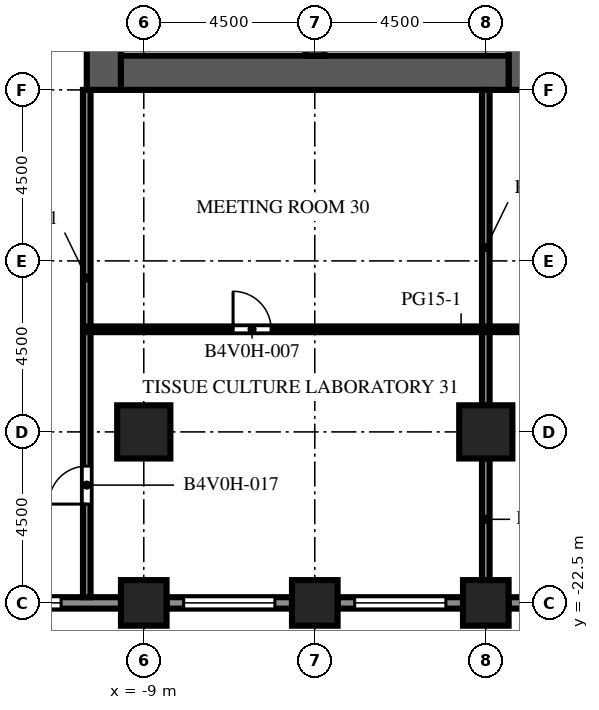
"""IFC4 building model, lengths in metres.
Left out: names, types, materials, properties, quantities, classifications, styles, units other than length and angle.
Written with IfcOpenShell. Run it as: python <this file> out.ifc"""

import sys

from ifc_helpers import new_model, si_unit, direction, frame, frame_2d, origin, origin_2d, place, context, subcontext, project, spatial, rectangle, extrude, element, fill, save


model = new_model("IFC4")
c1 = context("Model", 3, precision=1e-05, world=origin(), true_north=direction((0.0, 1.0)))
c2 = subcontext(c1, "Body", "Model", "MODEL_VIEW")
j1 = project(units=[si_unit("LENGTHUNIT", "METRE"), si_unit("PLANEANGLEUNIT", "RADIAN")], contexts=[c1])
p1 = place(None, origin())
s1 = spatial("IfcSite", under=j1, at=p1, CompositionType="ELEMENT")
p2 = place(p1, origin())
s2 = spatial("IfcBuilding", under=s1, at=p2, CompositionType="ELEMENT")
p3 = place(p2, frame((0.0, 0.0, 116.7)))
s3 = spatial("IfcBuildingStorey", under=s2, at=p3, CompositionType="ELEMENT", Elevation=116.7)
for number, where, z_axis, x_axis in (
    (1, (-9.0, -22.5, 0.0), (0.0, 0.0, 1.0), (1.0, 0.0, 0.0)),
    (2, (-4.5, -22.5, 0.0), (0.0, 0.0, 1.0), (1.0, 0.0, 0.0)),
    (3, (0.0, -22.5, 0.0), (0.0, 0.0, 1.0), (1.0, 0.0, 0.0)),
):
    element("IfcColumn", number, at=place(p3, frame(where, z_axis=z_axis, x_axis=x_axis)), inside=s3, PredefinedType="COLUMN", context=c2, shape_type="SweptSolid", body=[
        extrude(rectangle(XDim=1.2, YDim=1.2, at=origin_2d()), origin(), (0.0, 0.0, 1.0), 4.1),
    ])
p4 = place(p3, frame((-9.0, -18.0, -0.45), z_axis=(0.0, 0.0, 1.0), x_axis=(1.0, 0.0, 0.0)))
e4 = element("IfcColumn", 4, at=p4, inside=s3, PredefinedType="COLUMN", context=c2, shape_type="SweptSolid", body=[
    extrude(rectangle(XDim=1.4, YDim=1.4, at=origin_2d()), origin(), (0.0, 0.0, 1.0), 4.55),
])
p5 = place(p3, frame((0.0, -18.0, 0.0), z_axis=(0.0, 0.0, 1.0), x_axis=(1.0, 0.0, 0.0)))
e5 = element("IfcColumn", 5, at=p5, inside=s3, PredefinedType="COLUMN", context=c2, shape_type="SweptSolid", body=[
    extrude(rectangle(XDim=1.4, YDim=1.4, at=origin_2d()), origin(), (0.0, 0.0, 1.0), 4.1),
])
p6 = place(p3, frame((-10.05, -9.0, 0.0), z_axis=(0.0, 0.0, 1.0), x_axis=(0.0, 1.0, 0.0)))
e6 = element("IfcWall", 6, at=p6, inside=s3, PredefinedType="SHEAR", context=c2, shape_type="SweptSolid", body=[
    extrude(rectangle(XDim=27.5, YDim=0.9, at=frame_2d((13.75, 0.0))), origin(), (0.0, 0.0, 1.0), 4.1),
])
p7 = place(p6, frame((12.55, 0.0, 0.0)))
e7 = element("IfcOpeningElement", 7, at=p7, cuts=e6, PredefinedType="OPENING", context=c2, shape_type="SweptSolid", body=[
    extrude(rectangle(XDim=2.4, YDim=2.4, at=frame_2d((1.2, 1.2))), frame((0.0, 0.46, 0.0), z_axis=(0.0, -1.0, 0.0), x_axis=(1.0, 0.0, 0.0)), (0.0, 0.0, 1.0), 0.92),
])
p8 = place(p6, frame((6.825, 0.0, 0.0)))
e8 = element("IfcOpeningElement", 8, at=p8, cuts=e6, PredefinedType="OPENING", context=c2, shape_type="SweptSolid", body=[
    extrude(rectangle(XDim=1.2, YDim=2.1, at=frame_2d((0.6, 1.05))), frame((0.0, 0.46, 0.0), z_axis=(0.0, -1.0, 0.0), x_axis=(1.0, 0.0, 0.0)), (0.0, 0.0, 1.0), 0.92),
])
p9 = place(p6, frame((19.475, 0.0, 0.0)))
e9 = element("IfcOpeningElement", 9, at=p9, cuts=e6, PredefinedType="OPENING", context=c2, shape_type="SweptSolid", body=[
    extrude(rectangle(XDim=1.2, YDim=2.1, at=frame_2d((0.6, 1.05))), frame((0.0, 0.46, 0.0), z_axis=(0.0, -1.0, 0.0), x_axis=(1.0, 0.0, 0.0)), (0.0, 0.0, 1.0), 0.92),
])
p10 = place(p3, frame((1.05, -9.0, 0.0), z_axis=(0.0, 0.0, 1.0), x_axis=(0.0, 1.0, 0.0)))
e10 = element("IfcWall", 10, at=p10, inside=s3, PredefinedType="SHEAR", context=c2, shape_type="SweptSolid", body=[
    extrude(rectangle(XDim=27.5, YDim=0.9, at=frame_2d((13.75, 0.0))), origin(), (0.0, 0.0, 1.0), 4.1),
])
p11 = place(p10, frame((12.55, 0.0, 0.0)))
e11 = element("IfcOpeningElement", 11, at=p11, cuts=e10, PredefinedType="OPENING", context=c2, shape_type="SweptSolid", body=[
    extrude(rectangle(XDim=2.4, YDim=2.4, at=frame_2d((1.2, 1.2))), frame((0.0, 0.46, 0.0), z_axis=(0.0, -1.0, 0.0), x_axis=(1.0, 0.0, 0.0)), (0.0, 0.0, 1.0), 0.92),
])
p12 = place(p10, frame((3.975, 0.0, 0.0)))
e12 = element("IfcOpeningElement", 12, at=p12, cuts=e10, PredefinedType="OPENING", context=c2, shape_type="SweptSolid", body=[
    extrude(rectangle(XDim=1.2, YDim=2.1, at=frame_2d((0.6, 1.05))), frame((0.0, 0.46, 0.0), z_axis=(0.0, -1.0, 0.0), x_axis=(1.0, 0.0, 0.0)), (0.0, 0.0, 1.0), 0.92),
])
p13 = place(p10, frame((19.485, 0.0, 0.0)))
e13 = element("IfcOpeningElement", 13, at=p13, cuts=e10, PredefinedType="OPENING", context=c2, shape_type="SweptSolid", body=[
    extrude(rectangle(XDim=1.0, YDim=2.1, at=frame_2d((0.5, 1.05))), frame((0.0, 0.46, 0.0), z_axis=(0.0, -1.0, 0.0), x_axis=(1.0, 0.0, 0.0)), (0.0, 0.0, 1.0), 0.92),
])
p14 = place(p10, frame((21.139, 0.0, 0.0)))
e14 = element("IfcOpeningElement", 14, at=p14, cuts=e10, PredefinedType="OPENING", context=c2, shape_type="SweptSolid", body=[
    extrude(rectangle(XDim=1.0, YDim=2.1, at=frame_2d((0.5, 1.05))), frame((0.0, 0.46, 0.0), z_axis=(0.0, -1.0, 0.0), x_axis=(1.0, 0.0, 0.0)), (0.0, 0.0, 1.0), 0.92),
])
p15 = place(p10, frame((23.16, 0.0, 0.0)))
e15 = element("IfcOpeningElement", 15, at=p15, cuts=e10, PredefinedType="OPENING", context=c2, shape_type="SweptSolid", body=[
    extrude(rectangle(XDim=1.0, YDim=2.1, at=frame_2d((0.5, 1.05))), frame((0.0, 0.46, 0.0), z_axis=(0.0, -1.0, 0.0), x_axis=(1.0, 0.0, 0.0)), (0.0, 0.0, 1.0), 0.92),
])
p16 = place(p10, frame((25.181, 0.0, 0.0)))
e16 = element("IfcOpeningElement", 16, at=p16, cuts=e10, PredefinedType="OPENING", context=c2, shape_type="SweptSolid", body=[
    extrude(rectangle(XDim=1.0, YDim=2.1, at=frame_2d((0.5, 1.05))), frame((0.0, 0.46, 0.0), z_axis=(0.0, -1.0, 0.0), x_axis=(1.0, 0.0, 0.0)), (0.0, 0.0, 1.0), 0.92),
])
p17 = place(p3, frame((-9.6, -8.55, 0.0), z_axis=(0.0, 0.0, 1.0), x_axis=(1.0, 0.0, 0.0)))
e17 = element("IfcWall", 17, at=p17, inside=s3, PredefinedType="SHEAR", context=c2, shape_type="SweptSolid", body=[
    extrude(rectangle(XDim=10.2, YDim=0.9, at=frame_2d((5.1, 0.0))), origin(), (0.0, 0.0, 1.0), 4.1),
])
p18 = place(p3, frame((-4.5, -8.1, 0.0), z_axis=(0.0, 0.0, 1.0), x_axis=(0.0, 1.0, 0.0)))
e18 = element("IfcWall", 18, at=p18, inside=s3, PredefinedType="SHEAR", context=c2, shape_type="SweptSolid", body=[
    extrude(rectangle(XDim=7.35, YDim=0.5, at=frame_2d((3.675, 0.0))), origin(), (0.0, 0.0, 1.0), 4.1),
])
p19 = place(p3, frame((-9.6, -22.5, 0.0), z_axis=(0.0, 0.0, 1.0), x_axis=(-1.0, 0.0, 0.0)))
e19 = element("IfcWall", 19, at=p19, inside=s3, PredefinedType="SOLIDWALL", context=c2, shape_type="SweptSolid", body=[
    extrude(rectangle(XDim=3.3, YDim=0.3, at=frame_2d((1.65, 0.0))), origin(), (0.0, 0.0, 1.0), 2.75),
])
p20 = place(p19, frame((1.575, 0.0, 0.8)))
e20 = element("IfcOpeningElement", 20, at=p20, cuts=e19, PredefinedType="OPENING", context=c2, shape_type="SweptSolid", body=[
    extrude(rectangle(XDim=1.2, YDim=1.7, at=frame_2d((0.6, 0.85))), frame((0.0, 0.16, 0.0), z_axis=(0.0, -1.0, 0.0), x_axis=(1.0, 0.0, 0.0)), (0.0, 0.0, 1.0), 0.32),
])
p21 = place(p3, frame((-5.1, -22.5, 0.0), z_axis=(0.0, 0.0, 1.0), x_axis=(-1.0, 0.0, 0.0)))
e21 = element("IfcWall", 21, at=p21, inside=s3, PredefinedType="SOLIDWALL", context=c2, shape_type="SweptSolid", body=[
    extrude(rectangle(XDim=3.3, YDim=0.3, at=frame_2d((1.65, 0.0))), origin(), (0.0, 0.0, 1.0), 2.75),
])
p22 = place(p21, frame((0.45, 0.0, 0.8)))
e22 = element("IfcOpeningElement", 22, at=p22, cuts=e21, PredefinedType="OPENING", context=c2, shape_type="SweptSolid", body=[
    extrude(rectangle(XDim=2.4, YDim=1.7, at=frame_2d((1.2, 0.85))), frame((0.0, 0.16, 0.0), z_axis=(0.0, -1.0, 0.0), x_axis=(1.0, 0.0, 0.0)), (0.0, 0.0, 1.0), 0.32),
])
p23 = place(p3, frame((-0.6, -22.5, 0.0), z_axis=(0.0, 0.0, 1.0), x_axis=(-1.0, 0.0, 0.0)))
e23 = element("IfcWall", 23, at=p23, inside=s3, PredefinedType="SOLIDWALL", context=c2, shape_type="SweptSolid", body=[
    extrude(rectangle(XDim=3.3, YDim=0.3, at=frame_2d((1.65, 0.0))), origin(), (0.0, 0.0, 1.0), 2.75),
])
p24 = place(p23, frame((0.45, 0.0, 0.8)))
e24 = element("IfcOpeningElement", 24, at=p24, cuts=e23, PredefinedType="OPENING", context=c2, shape_type="SweptSolid", body=[
    extrude(rectangle(XDim=2.4, YDim=1.7, at=frame_2d((1.2, 0.85))), frame((0.0, 0.16, 0.0), z_axis=(0.0, -1.0, 0.0), x_axis=(1.0, 0.0, 0.0)), (0.0, 0.0, 1.0), 0.32),
])
p25 = place(p3, frame((3.9, -22.5, 0.0), z_axis=(0.0, 0.0, 1.0), x_axis=(-1.0, 0.0, 0.0)))
e25 = element("IfcWall", 25, at=p25, inside=s3, PredefinedType="SOLIDWALL", context=c2, shape_type="SweptSolid", body=[
    extrude(rectangle(XDim=3.3, YDim=0.3, at=frame_2d((1.65, 0.0))), origin(), (0.0, 0.0, 1.0), 2.75),
])
p26 = place(p25, frame((0.45, 0.0, 0.8)))
e26 = element("IfcOpeningElement", 26, at=p26, cuts=e25, PredefinedType="OPENING", context=c2, shape_type="SweptSolid", body=[
    extrude(rectangle(XDim=2.4, YDim=1.7, at=frame_2d((1.2, 0.85))), frame((0.0, 0.16, 0.0), z_axis=(0.0, -1.0, 0.0), x_axis=(1.0, 0.0, 0.0)), (0.0, 0.0, 1.0), 0.32),
])
p27 = place(p3, frame((-10.5, -9.0, 0.0), z_axis=(0.0, 0.0, 1.0), x_axis=(0.0, -1.0, 0.0)))
e27 = element("IfcWall", 27, at=p27, inside=s3, PredefinedType="PARTITIONING", context=c2, shape_type="SweptSolid", body=[
    extrude(rectangle(XDim=13.35, YDim=0.2, at=frame_2d((6.675, 0.0))), origin(), (0.0, 0.0, 1.0), 3.65),
])
p28 = place(p27, frame((9.9, 0.0, 0.0)))
e28 = element("IfcOpeningElement", 28, at=p28, cuts=e27, PredefinedType="OPENING", context=c2, shape_type="SweptSolid", body=[
    extrude(rectangle(XDim=1.0, YDim=2.1, at=frame_2d((0.5, 1.05))), frame((0.0, 0.11, 0.0), z_axis=(0.0, -1.0, 0.0), x_axis=(1.0, 0.0, 0.0)), (0.0, 0.0, 1.0), 0.22),
])
p29 = place(p3, frame((0.0, -21.9, 0.0), z_axis=(0.0, 0.0, 1.0), x_axis=(0.0, 1.0, 0.0)))
e29 = element("IfcWall", 29, at=p29, inside=s3, PredefinedType="PARTITIONING", context=c2, shape_type="SweptSolid", body=[
    extrude(rectangle(XDim=3.2, YDim=0.2, at=frame_2d((1.6, 0.0))), origin(), (0.0, 0.0, 1.0), 3.65),
])
p30 = place(p3, frame((0.0, -17.3, 0.0), z_axis=(0.0, 0.0, 1.0), x_axis=(0.0, 1.0, 0.0)))
e30 = element("IfcWall", 30, at=p30, inside=s3, PredefinedType="PARTITIONING", context=c2, shape_type="SweptSolid", body=[
    extrude(rectangle(XDim=8.3, YDim=0.2, at=frame_2d((4.15, 0.0))), origin(), (0.0, 0.0, 1.0), 3.65),
])
p31 = place(p3, frame((-10.5, -15.3, 0.0), z_axis=(0.0, 0.0, 1.0), x_axis=(1.0, 0.0, 0.0)))
e31 = element("IfcWall", 31, at=p31, inside=s3, PredefinedType="PARTITIONING", context=c2, shape_type="SweptSolid", body=[
    extrude(rectangle(XDim=28.5, YDim=0.15, at=frame_2d((14.25, 0.0))), origin(), (0.0, 0.0, 1.0), 3.65),
])
p32 = place(p31, frame((3.85, 0.0, 0.0)))
e32 = element("IfcOpeningElement", 32, at=p32, cuts=e31, PredefinedType="OPENING", context=c2, shape_type="SweptSolid", body=[
    extrude(rectangle(XDim=1.0, YDim=2.1, at=frame_2d((0.5, 1.05))), frame((0.0, 0.085, 0.0), z_axis=(0.0, -1.0, 0.0), x_axis=(1.0, 0.0, 0.0)), (0.0, 0.0, 1.0), 0.17),
])
p33 = place(p31, frame((14.85, 0.0, 0.0)))
e33 = element("IfcOpeningElement", 33, at=p33, cuts=e31, PredefinedType="OPENING", context=c2, shape_type="SweptSolid", body=[
    extrude(rectangle(XDim=1.0, YDim=2.1, at=frame_2d((0.5, 1.05))), frame((0.0, 0.085, 0.0), z_axis=(0.0, -1.0, 0.0), x_axis=(1.0, 0.0, 0.0)), (0.0, 0.0, 1.0), 0.17),
])
p34 = place(p31, frame((21.85, 0.0, 0.0)))
e34 = element("IfcOpeningElement", 34, at=p34, cuts=e31, PredefinedType="OPENING", context=c2, shape_type="SweptSolid", body=[
    extrude(rectangle(XDim=1.0, YDim=2.1, at=frame_2d((0.5, 1.05))), frame((0.0, 0.085, 0.0), z_axis=(0.0, -1.0, 0.0), x_axis=(1.0, 0.0, 0.0)), (0.0, 0.0, 1.0), 0.17),
])
p35 = place(p31, frame((26.1, 0.0, 0.0)))
e35 = element("IfcOpeningElement", 35, at=p35, cuts=e31, PredefinedType="OPENING", context=c2, shape_type="SweptSolid", body=[
    extrude(rectangle(XDim=1.0, YDim=2.1, at=frame_2d((0.5, 1.05))), frame((0.0, 0.085, 0.0), z_axis=(0.0, -1.0, 0.0), x_axis=(1.0, 0.0, 0.0)), (0.0, 0.0, 1.0), 0.17),
])
p36 = place(p20, origin())
e36 = element("IfcWindow", 36, at=p36, inside=s3, PartitioningType="SINGLE_PANEL", PredefinedType="WINDOW", context=c2, shape_type="SweptSolid", body=[
    extrude(rectangle(XDim=1.2, YDim=1.7, at=frame_2d((0.6, 0.85))), frame((0.0, 0.03, 0.0), z_axis=(0.0, -1.0, 0.0), x_axis=(1.0, 0.0, 0.0)), (0.0, 0.0, 1.0), 0.06),
])
fill(e20, e36)
p37 = place(p22, origin())
e37 = element("IfcWindow", 37, at=p37, inside=s3, PartitioningType="SINGLE_PANEL", PredefinedType="WINDOW", context=c2, shape_type="SweptSolid", body=[
    extrude(rectangle(XDim=2.4, YDim=1.7, at=frame_2d((1.2, 0.85))), frame((0.0, 0.03, 0.0), z_axis=(0.0, -1.0, 0.0), x_axis=(1.0, 0.0, 0.0)), (0.0, 0.0, 1.0), 0.06),
])
fill(e22, e37)
p38 = place(p24, origin())
e38 = element("IfcWindow", 38, at=p38, inside=s3, PartitioningType="SINGLE_PANEL", PredefinedType="WINDOW", context=c2, shape_type="SweptSolid", body=[
    extrude(rectangle(XDim=2.4, YDim=1.7, at=frame_2d((1.2, 0.85))), frame((0.0, 0.03, 0.0), z_axis=(0.0, -1.0, 0.0), x_axis=(1.0, 0.0, 0.0)), (0.0, 0.0, 1.0), 0.06),
])
fill(e24, e38)
p39 = place(p32, origin())
e39 = element("IfcDoor", 39, at=p39, inside=s3, OperationType="SINGLE_SWING_LEFT", PredefinedType="DOOR", context=c2, shape_type="SweptSolid", body=[
    extrude(rectangle(XDim=1.0, YDim=2.1, at=frame_2d((0.5, 1.05))), frame((0.0, 0.025, 0.0), z_axis=(0.0, -1.0, 0.0), x_axis=(1.0, 0.0, 0.0)), (0.0, 0.0, 1.0), 0.05),
])
fill(e32, e39)
p40 = place(p28, origin())
e40 = element("IfcDoor", 40, at=p40, inside=s3, OperationType="SINGLE_SWING_RIGHT", PredefinedType="DOOR", context=c2, shape_type="SweptSolid", body=[
    extrude(rectangle(XDim=1.0, YDim=2.1, at=frame_2d((0.5, 1.05))), frame((0.0, 0.025, 0.0), z_axis=(0.0, -1.0, 0.0), x_axis=(1.0, 0.0, 0.0)), (0.0, 0.0, 1.0), 0.05),
])
fill(e28, e40)
save(model, sys.argv[1])
